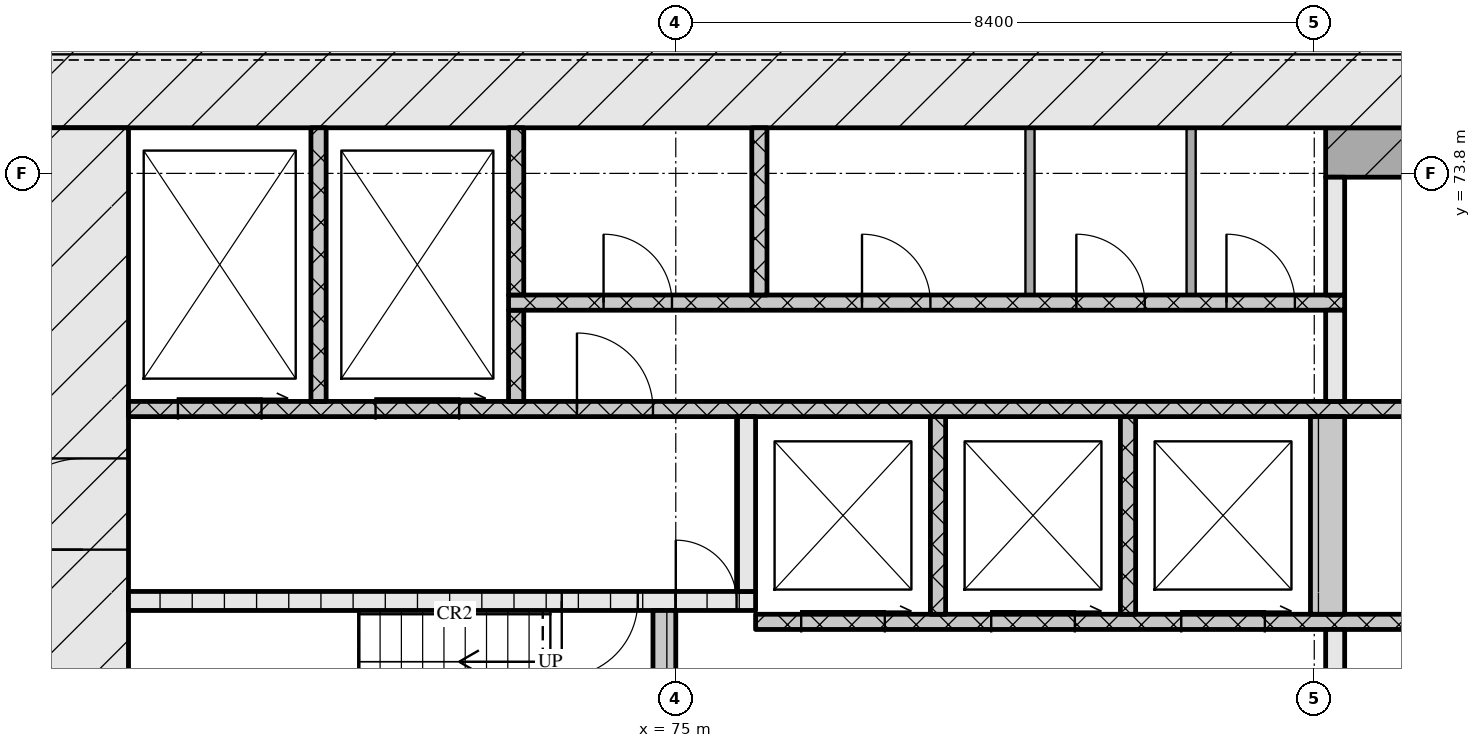
"""IFC4 building model, lengths in metres.
Left out: names, types, materials, properties, quantities, classifications, styles, units other than length and angle.
Written with IfcOpenShell. Run it as: python <this file> out.ifc"""

import sys

from ifc_helpers import new_model, si_unit, direction, frame, frame_2d, origin, place, context, subcontext, project, spatial, rectangle, extrude, element, fill, save


model = new_model("IFC4")
c1 = context("Model", 3, precision=1e-05, world=origin(), true_north=direction((0.0, 1.0)))
c2 = subcontext(c1, "Body", "Model", "MODEL_VIEW")
j1 = project(units=[si_unit("LENGTHUNIT", "METRE"), si_unit("PLANEANGLEUNIT", "RADIAN")], contexts=[c1])
p1 = place(None, origin())
s1 = spatial("IfcSite", under=j1, at=p1, CompositionType="ELEMENT")
p2 = place(p1, origin())
s2 = spatial("IfcBuilding", under=s1, at=p2, CompositionType="ELEMENT")
p3 = place(p2, frame((0.0, 0.0, 48.0)))
s3 = spatial("IfcBuildingStorey", under=s2, at=p3, CompositionType="ELEMENT", Elevation=48.0)
p4 = place(p3, frame((66.6, 75.0, 0.0), z_axis=(0.0, 0.0, 1.0), x_axis=(1.0, 0.0, 0.0)))
e1 = element("IfcWall", 1, at=p4, inside=s3, PredefinedType="SOLIDWALL", context=c2, shape_type="SweptSolid", body=[
    extrude(rectangle(XDim=42.0, YDim=1.2, at=frame_2d((21.0, 0.0))), origin(), (0.0, 0.0, 1.0), 3.32),
])
p5 = place(p3, frame((67.2, 62.4, 0.0), z_axis=(0.0, 0.0, 1.0), x_axis=(0.0, 1.0, 0.0)))
e2 = element("IfcWall", 2, at=p5, inside=s3, PredefinedType="SOLIDWALL", context=c2, shape_type="SweptSolid", body=[
    extrude(rectangle(XDim=12.0, YDim=1.2, at=frame_2d((6.0, 0.0))), origin(), (0.0, 0.0, 1.0), 3.32),
])
p6 = place(p5, frame((6.45, 0.0, 0.0)))
e3 = element("IfcOpeningElement", 3, at=p6, cuts=e2, PredefinedType="OPENING", context=c2, shape_type="SweptSolid", body=[
    extrude(rectangle(XDim=1.2, YDim=2.1, at=frame_2d((0.6, 1.05))), frame((0.0, 0.61, 0.0), z_axis=(0.0, -1.0, 0.0), x_axis=(1.0, 0.0, 0.0)), (0.0, 0.0, 1.0), 1.22),
])
p7 = place(p3, frame((74.85, 65.2, 0.0), z_axis=(0.0, 0.0, 1.0), x_axis=(0.0, 1.0, 0.0)))
e4 = element("IfcWall", 4, at=p7, inside=s3, PredefinedType="SOLIDWALL", context=c2, shape_type="SweptSolid", body=[
    extrude(rectangle(XDim=2.85, YDim=0.3, at=frame_2d((1.425, 0.0))), origin(), (0.0, 0.0, 1.0), 3.32),
])
p8 = place(p3, frame((83.675, 65.2, 0.0), z_axis=(0.0, 0.0, 1.0), x_axis=(0.0, 1.0, 0.0)))
e5 = element("IfcWall", 5, at=p8, inside=s3, PredefinedType="SOLIDWALL", context=c2, shape_type="SweptSolid", body=[
    extrude(rectangle(XDim=2.6, YDim=0.25, at=frame_2d((1.3, 0.0))), origin(), (0.0, 0.0, 1.0), 3.32),
])
p9 = place(p8, frame((0.7, 0.0, 0.0)))
e6 = element("IfcOpeningElement", 6, at=p9, cuts=e5, PredefinedType="OPENING", context=c2, shape_type="SweptSolid", body=[
    extrude(rectangle(XDim=1.2, YDim=2.1, at=frame_2d((0.6, 1.05))), frame((0.0, 0.135, 0.0), z_axis=(0.0, -1.0, 0.0), x_axis=(1.0, 0.0, 0.0)), (0.0, 0.0, 1.0), 0.27),
])
p10 = place(p3, frame((76.05, 67.9, 0.0), z_axis=(0.0, 0.0, 1.0), x_axis=(1.0, 0.0, 0.0)))
e7 = element("IfcWall", 7, at=p10, inside=s3, PredefinedType="SOLIDWALL", context=c2, shape_type="SweptSolid", body=[
    extrude(rectangle(XDim=23.1, YDim=0.2, at=frame_2d((11.55, 0.0))), origin(), (0.0, 0.0, 1.0), 3.32),
])
p11 = place(p10, frame((0.6, 0.0, 0.0)))
e8 = element("IfcOpeningElement", 8, at=p11, cuts=e7, PredefinedType="OPENING", context=c2, shape_type="SweptSolid", body=[
    extrude(rectangle(XDim=1.1, YDim=2.1, at=frame_2d((0.55, 1.05))), frame((0.0, 0.11, 0.0), z_axis=(0.0, -1.0, 0.0), x_axis=(1.0, 0.0, 0.0)), (0.0, 0.0, 1.0), 0.22),
])
p12 = place(p10, frame((3.1, 0.0, 0.0)))
e9 = element("IfcOpeningElement", 9, at=p12, cuts=e7, PredefinedType="OPENING", context=c2, shape_type="SweptSolid", body=[
    extrude(rectangle(XDim=1.1, YDim=2.1, at=frame_2d((0.55, 1.05))), frame((0.0, 0.11, 0.0), z_axis=(0.0, -1.0, 0.0), x_axis=(1.0, 0.0, 0.0)), (0.0, 0.0, 1.0), 0.22),
])
p13 = place(p10, frame((5.6, 0.0, 0.0)))
e10 = element("IfcOpeningElement", 10, at=p13, cuts=e7, PredefinedType="OPENING", context=c2, shape_type="SweptSolid", body=[
    extrude(rectangle(XDim=1.1, YDim=2.1, at=frame_2d((0.55, 1.05))), frame((0.0, 0.11, 0.0), z_axis=(0.0, -1.0, 0.0), x_axis=(1.0, 0.0, 0.0)), (0.0, 0.0, 1.0), 0.22),
])
p14 = place(p10, frame((9.7, 0.0, 0.0)))
e11 = element("IfcOpeningElement", 11, at=p14, cuts=e7, PredefinedType="OPENING", context=c2, shape_type="SweptSolid", body=[
    extrude(rectangle(XDim=0.9, YDim=2.1, at=frame_2d((0.45, 1.05))), frame((0.0, 0.11, 0.0), z_axis=(0.0, -1.0, 0.0), x_axis=(1.0, 0.0, 0.0)), (0.0, 0.0, 1.0), 0.22),
])
p15 = place(p10, frame((13.55, 0.0, 0.0)))
e12 = element("IfcOpeningElement", 12, at=p15, cuts=e7, PredefinedType="OPENING", context=c2, shape_type="SweptSolid", body=[
    extrude(rectangle(XDim=1.0, YDim=2.1, at=frame_2d((0.5, 1.05))), frame((0.0, 0.11, 0.0), z_axis=(0.0, -1.0, 0.0), x_axis=(1.0, 0.0, 0.0)), (0.0, 0.0, 1.0), 0.22),
])
for number, where, z_axis, x_axis in (
    (13, (78.45, 68.0, 0.0), (0.0, 0.0, 1.0), (0.0, 1.0, 0.0)),
    (14, (80.95, 68.0, 0.0), (0.0, 0.0, 1.0), (0.0, 1.0, 0.0)),
):
    element("IfcWall", number, at=place(p3, frame(where, z_axis=z_axis, x_axis=x_axis)), inside=s3, PredefinedType="SOLIDWALL", context=c2, shape_type="SweptSolid", body=[
        extrude(rectangle(XDim=2.6, YDim=0.2, at=frame_2d((1.3, 0.0))), origin(), (0.0, 0.0, 1.0), 3.32),
    ])
p16 = place(p3, frame((83.575, 68.0, 0.0), z_axis=(0.0, 0.0, 1.0), x_axis=(0.0, 1.0, 0.0)))
e15 = element("IfcWall", 15, at=p16, inside=s3, PredefinedType="SOLIDWALL", context=c2, shape_type="SweptSolid", body=[
    extrude(rectangle(XDim=2.6, YDim=0.45, at=frame_2d((1.3, 0.0))), origin(), (0.0, 0.0, 1.0), 3.32),
])
p17 = place(p3, frame((67.8, 68.175, 0.0), z_axis=(0.0, 0.0, 1.0), x_axis=(1.0, 0.0, 0.0)))
e16 = element("IfcWall", 16, at=p17, inside=s3, PredefinedType="SOLIDWALL", context=c2, shape_type="SweptSolid", body=[
    extrude(rectangle(XDim=8.25, YDim=0.25, at=frame_2d((4.125, 0.0))), origin(), (0.0, 0.0, 1.0), 3.32),
])
p18 = place(p17, frame((5.7, 0.0, 0.0)))
e17 = element("IfcOpeningElement", 17, at=p18, cuts=e16, PredefinedType="OPENING", context=c2, shape_type="SweptSolid", body=[
    extrude(rectangle(XDim=1.0, YDim=2.1, at=frame_2d((0.5, 1.05))), frame((0.0, 0.135, 0.0), z_axis=(0.0, -1.0, 0.0), x_axis=(1.0, 0.0, 0.0)), (0.0, 0.0, 1.0), 0.27),
])
p19 = place(p17, frame((7.2, 0.0, 0.0)))
e18 = element("IfcOpeningElement", 18, at=p19, cuts=e16, PredefinedType="OPENING", context=c2, shape_type="SweptSolid", body=[
    extrude(rectangle(XDim=0.8, YDim=2.1, at=frame_2d((0.4, 1.05))), frame((0.0, 0.135, 0.0), z_axis=(0.0, -1.0, 0.0), x_axis=(1.0, 0.0, 0.0)), (0.0, 0.0, 1.0), 0.27),
])
p20 = place(p3, frame((75.925, 68.3, 0.0), z_axis=(0.0, 0.0, 1.0), x_axis=(0.0, 1.0, 0.0)))
e19 = element("IfcWall", 19, at=p20, inside=s3, PredefinedType="SOLIDWALL", context=c2, shape_type="SweptSolid", body=[
    extrude(rectangle(XDim=2.3, YDim=0.25, at=frame_2d((1.15, 0.0))), origin(), (0.0, 0.0, 1.0), 3.32),
])
p21 = place(p3, frame((67.8, 70.7, 0.0), z_axis=(0.0, 0.0, 1.0), x_axis=(1.0, 0.0, 0.0)))
e20 = element("IfcWall", 20, at=p21, inside=s3, PredefinedType="SOLIDWALL", context=c2, shape_type="SweptSolid", body=[
    extrude(rectangle(XDim=39.6, YDim=0.2, at=frame_2d((19.8, 0.0))), origin(), (0.0, 0.0, 1.0), 3.32),
])
p22 = place(p21, frame((0.65, 0.0, 0.0)))
e21 = element("IfcOpeningElement", 21, at=p22, cuts=e20, PredefinedType="OPENING", context=c2, shape_type="SweptSolid", body=[
    extrude(rectangle(XDim=1.1, YDim=2.1, at=frame_2d((0.55, 1.05))), frame((0.0, 0.11, 0.0), z_axis=(0.0, -1.0, 0.0), x_axis=(1.0, 0.0, 0.0)), (0.0, 0.0, 1.0), 0.22),
])
p23 = place(p21, frame((3.25, 0.0, 0.0)))
e22 = element("IfcOpeningElement", 22, at=p23, cuts=e20, PredefinedType="OPENING", context=c2, shape_type="SweptSolid", body=[
    extrude(rectangle(XDim=1.1, YDim=2.1, at=frame_2d((0.55, 1.05))), frame((0.0, 0.11, 0.0), z_axis=(0.0, -1.0, 0.0), x_axis=(1.0, 0.0, 0.0)), (0.0, 0.0, 1.0), 0.22),
])
p24 = place(p21, frame((5.9, 0.0, 0.0)))
e23 = element("IfcOpeningElement", 23, at=p24, cuts=e20, PredefinedType="OPENING", context=c2, shape_type="SweptSolid", body=[
    extrude(rectangle(XDim=1.0, YDim=2.1, at=frame_2d((0.5, 1.05))), frame((0.0, 0.11, 0.0), z_axis=(0.0, -1.0, 0.0), x_axis=(1.0, 0.0, 0.0)), (0.0, 0.0, 1.0), 0.22),
])
p25 = place(p21, frame((21.7, 0.0, 0.0)))
e24 = element("IfcOpeningElement", 24, at=p25, cuts=e20, PredefinedType="OPENING", context=c2, shape_type="SweptSolid", body=[
    extrude(rectangle(XDim=1.0, YDim=2.1, at=frame_2d((0.5, 1.05))), frame((0.0, 0.11, 0.0), z_axis=(0.0, -1.0, 0.0), x_axis=(1.0, 0.0, 0.0)), (0.0, 0.0, 1.0), 0.22),
])
p26 = place(p21, frame((32.7, 0.0, 0.0)))
e25 = element("IfcOpeningElement", 25, at=p26, cuts=e20, PredefinedType="OPENING", context=c2, shape_type="SweptSolid", body=[
    extrude(rectangle(XDim=1.0, YDim=2.1, at=frame_2d((0.5, 1.05))), frame((0.0, 0.11, 0.0), z_axis=(0.0, -1.0, 0.0), x_axis=(1.0, 0.0, 0.0)), (0.0, 0.0, 1.0), 0.22),
])
p27 = place(p21, frame((35.25, 0.0, 0.0)))
e26 = element("IfcOpeningElement", 26, at=p27, cuts=e20, PredefinedType="OPENING", context=c2, shape_type="SweptSolid", body=[
    extrude(rectangle(XDim=1.1, YDim=2.1, at=frame_2d((0.55, 1.05))), frame((0.0, 0.11, 0.0), z_axis=(0.0, -1.0, 0.0), x_axis=(1.0, 0.0, 0.0)), (0.0, 0.0, 1.0), 0.22),
])
p28 = place(p21, frame((37.85, 0.0, 0.0)))
e27 = element("IfcOpeningElement", 27, at=p28, cuts=e20, PredefinedType="OPENING", context=c2, shape_type="SweptSolid", body=[
    extrude(rectangle(XDim=1.1, YDim=2.1, at=frame_2d((0.55, 1.05))), frame((0.0, 0.11, 0.0), z_axis=(0.0, -1.0, 0.0), x_axis=(1.0, 0.0, 0.0)), (0.0, 0.0, 1.0), 0.22),
])
p29 = place(p3, frame((70.3, 70.8, 0.0), z_axis=(0.0, 0.0, 1.0), x_axis=(0.0, 1.0, 0.0)))
e28 = element("IfcWall", 28, at=p29, inside=s3, PredefinedType="SOLIDWALL", context=c2, shape_type="SweptSolid", body=[
    extrude(rectangle(XDim=3.6, YDim=0.2, at=frame_2d((1.8, 0.0))), origin(), (0.0, 0.0, 1.0), 3.32),
])
p30 = place(p3, frame((72.9, 70.8, 0.0), z_axis=(0.0, 0.0, 1.0), x_axis=(0.0, 1.0, 0.0)))
e29 = element("IfcWall", 29, at=p30, inside=s3, PredefinedType="SOLIDWALL", context=c2, shape_type="SweptSolid", body=[
    extrude(rectangle(XDim=1.2, YDim=0.2, at=frame_2d((0.6, 0.0))), origin(), (0.0, 0.0, 1.0), 3.32),
])
p31 = place(p3, frame((83.675, 70.8, 0.0), z_axis=(0.0, 0.0, 1.0), x_axis=(0.0, 1.0, 0.0)))
e30 = element("IfcWall", 30, at=p31, inside=s3, PredefinedType="SOLIDWALL", context=c2, shape_type="SweptSolid", body=[
    extrude(rectangle(XDim=1.2, YDim=0.25, at=frame_2d((0.6, 0.0))), origin(), (0.0, 0.0, 1.0), 3.32),
])
p32 = place(p3, frame((72.8, 72.1, 0.0), z_axis=(0.0, 0.0, 1.0), x_axis=(1.0, 0.0, 0.0)))
e31 = element("IfcWall", 31, at=p32, inside=s3, PredefinedType="SOLIDWALL", context=c2, shape_type="SweptSolid", body=[
    extrude(rectangle(XDim=11.0, YDim=0.2, at=frame_2d((5.5, 0.0))), origin(), (0.0, 0.0, 1.0), 3.32),
])
p33 = place(p32, frame((1.25, 0.0, 0.0)))
e32 = element("IfcOpeningElement", 32, at=p33, cuts=e31, PredefinedType="OPENING", context=c2, shape_type="SweptSolid", body=[
    extrude(rectangle(XDim=0.9, YDim=2.1, at=frame_2d((0.45, 1.05))), frame((0.0, 0.11, 0.0), z_axis=(0.0, -1.0, 0.0), x_axis=(1.0, 0.0, 0.0)), (0.0, 0.0, 1.0), 0.22),
])
p34 = place(p32, frame((4.65, 0.0, 0.0)))
e33 = element("IfcOpeningElement", 33, at=p34, cuts=e31, PredefinedType="OPENING", context=c2, shape_type="SweptSolid", body=[
    extrude(rectangle(XDim=0.9, YDim=2.1, at=frame_2d((0.45, 1.05))), frame((0.0, 0.11, 0.0), z_axis=(0.0, -1.0, 0.0), x_axis=(1.0, 0.0, 0.0)), (0.0, 0.0, 1.0), 0.22),
])
p35 = place(p32, frame((7.47, 0.0, 0.0)))
e34 = element("IfcOpeningElement", 34, at=p35, cuts=e31, PredefinedType="OPENING", context=c2, shape_type="SweptSolid", body=[
    extrude(rectangle(XDim=0.9, YDim=2.1, at=frame_2d((0.45, 1.05))), frame((0.0, 0.11, 0.0), z_axis=(0.0, -1.0, 0.0), x_axis=(1.0, 0.0, 0.0)), (0.0, 0.0, 1.0), 0.22),
])
p36 = place(p32, frame((9.445, 0.0, 0.0)))
e35 = element("IfcOpeningElement", 35, at=p36, cuts=e31, PredefinedType="OPENING", context=c2, shape_type="SweptSolid", body=[
    extrude(rectangle(XDim=0.9, YDim=2.1, at=frame_2d((0.45, 1.05))), frame((0.0, 0.11, 0.0), z_axis=(0.0, -1.0, 0.0), x_axis=(1.0, 0.0, 0.0)), (0.0, 0.0, 1.0), 0.22),
])
for number, where, z_axis, x_axis in (
    (36, (72.9, 72.2, 0.0), (0.0, 0.0, 1.0), (0.0, 1.0, 0.0)),
    (37, (76.1, 72.2, 0.0), (0.0, 0.0, 1.0), (0.0, 1.0, 0.0)),
):
    element("IfcWall", number, at=place(p3, frame(where, z_axis=z_axis, x_axis=x_axis)), inside=s3, PredefinedType="SOLIDWALL", context=c2, shape_type="SweptSolid", body=[
        extrude(rectangle(XDim=2.2, YDim=0.2, at=frame_2d((1.1, 0.0))), origin(), (0.0, 0.0, 1.0), 3.32),
    ])
for number, where, z_axis, x_axis in (
    (38, (79.66, 72.2, 0.0), (0.0, 0.0, 1.0), (0.0, 1.0, 0.0)),
    (39, (81.78, 72.2, 0.0), (0.0, 0.0, 1.0), (0.0, 1.0, 0.0)),
):
    element("IfcWall", number, at=place(p3, frame(where, z_axis=z_axis, x_axis=x_axis)), inside=s3, PredefinedType="PARTITIONING", context=c2, shape_type="SweptSolid", body=[
        extrude(rectangle(XDim=2.2, YDim=0.12, at=frame_2d((1.1, 0.0))), origin(), (0.0, 0.0, 1.0), 3.32),
    ])
p37 = place(p3, frame((83.675, 72.2, 0.0), z_axis=(0.0, 0.0, 1.0), x_axis=(0.0, 1.0, 0.0)))
e40 = element("IfcWall", 40, at=p37, inside=s3, PredefinedType="SOLIDWALL", context=c2, shape_type="SweptSolid", body=[
    extrude(rectangle(XDim=1.55, YDim=0.25, at=frame_2d((0.775, 0.0))), origin(), (0.0, 0.0, 1.0), 3.32),
])
p38 = place(p3, frame((83.55, 74.075, 0.0), z_axis=(0.0, 0.0, 1.0), x_axis=(1.0, 0.0, 0.0)))
e41 = element("IfcWall", 41, at=p38, inside=s3, PredefinedType="SOLIDWALL", context=c2, shape_type="SweptSolid", body=[
    extrude(rectangle(XDim=8.1, YDim=0.65, at=frame_2d((4.05, 0.0))), origin(), (0.0, 0.0, 1.0), 3.32),
])
p39 = place(p11, origin())
e42 = element("IfcDoor", 42, at=p39, inside=s3, OperationType="SLIDING_TO_RIGHT", PredefinedType="DOOR", context=c2, shape_type="SweptSolid", body=[
    extrude(rectangle(XDim=1.1, YDim=2.1, at=frame_2d((0.55, 1.05))), frame((0.0, 0.025, 0.0), z_axis=(0.0, -1.0, 0.0), x_axis=(1.0, 0.0, 0.0)), (0.0, 0.0, 1.0), 0.05),
])
fill(e8, e42)
p40 = place(p12, origin())
e43 = element("IfcDoor", 43, at=p40, inside=s3, OperationType="SLIDING_TO_RIGHT", PredefinedType="DOOR", context=c2, shape_type="SweptSolid", body=[
    extrude(rectangle(XDim=1.1, YDim=2.1, at=frame_2d((0.55, 1.05))), frame((0.0, 0.025, 0.0), z_axis=(0.0, -1.0, 0.0), x_axis=(1.0, 0.0, 0.0)), (0.0, 0.0, 1.0), 0.05),
])
fill(e9, e43)
p41 = place(p13, origin())
e44 = element("IfcDoor", 44, at=p41, inside=s3, OperationType="SLIDING_TO_RIGHT", PredefinedType="DOOR", context=c2, shape_type="SweptSolid", body=[
    extrude(rectangle(XDim=1.1, YDim=2.1, at=frame_2d((0.55, 1.05))), frame((0.0, 0.025, 0.0), z_axis=(0.0, -1.0, 0.0), x_axis=(1.0, 0.0, 0.0)), (0.0, 0.0, 1.0), 0.05),
])
fill(e10, e44)
p42 = place(p18, origin())
e45 = element("IfcDoor", 45, at=p42, inside=s3, OperationType="SINGLE_SWING_RIGHT", PredefinedType="DOOR", context=c2, shape_type="SweptSolid", body=[
    extrude(rectangle(XDim=1.0, YDim=2.1, at=frame_2d((0.5, 1.05))), frame((0.0, 0.025, 0.0), z_axis=(0.0, -1.0, 0.0), x_axis=(1.0, 0.0, 0.0)), (0.0, 0.0, 1.0), 0.05),
])
fill(e17, e45)
p43 = place(p19, origin())
e46 = element("IfcDoor", 46, at=p43, inside=s3, OperationType="SINGLE_SWING_LEFT", PredefinedType="DOOR", context=c2, shape_type="SweptSolid", body=[
    extrude(rectangle(XDim=0.8, YDim=2.1, at=frame_2d((0.4, 1.05))), frame((0.0, 0.025, 0.0), z_axis=(0.0, -1.0, 0.0), x_axis=(1.0, 0.0, 0.0)), (0.0, 0.0, 1.0), 0.05),
])
fill(e18, e46)
p44 = place(p6, origin())
e47 = element("IfcDoor", 47, at=p44, inside=s3, OperationType="SINGLE_SWING_LEFT", PredefinedType="DOOR", context=c2, shape_type="SweptSolid", body=[
    extrude(rectangle(XDim=1.2, YDim=2.1, at=frame_2d((0.6, 1.05))), frame((0.0, 0.025, 0.0), z_axis=(0.0, -1.0, 0.0), x_axis=(1.0, 0.0, 0.0)), (0.0, 0.0, 1.0), 0.05),
])
fill(e3, e47)
p45 = place(p22, origin())
e48 = element("IfcDoor", 48, at=p45, inside=s3, OperationType="SLIDING_TO_RIGHT", PredefinedType="DOOR", context=c2, shape_type="SweptSolid", body=[
    extrude(rectangle(XDim=1.1, YDim=2.1, at=frame_2d((0.55, 1.05))), frame((0.0, 0.025, 0.0), z_axis=(0.0, -1.0, 0.0), x_axis=(1.0, 0.0, 0.0)), (0.0, 0.0, 1.0), 0.05),
])
fill(e21, e48)
p46 = place(p23, origin())
e49 = element("IfcDoor", 49, at=p46, inside=s3, OperationType="SLIDING_TO_RIGHT", PredefinedType="DOOR", context=c2, shape_type="SweptSolid", body=[
    extrude(rectangle(XDim=1.1, YDim=2.1, at=frame_2d((0.55, 1.05))), frame((0.0, 0.025, 0.0), z_axis=(0.0, -1.0, 0.0), x_axis=(1.0, 0.0, 0.0)), (0.0, 0.0, 1.0), 0.05),
])
fill(e22, e49)
p47 = place(p24, origin())
e50 = element("IfcDoor", 50, at=p47, inside=s3, OperationType="SINGLE_SWING_LEFT", PredefinedType="DOOR", context=c2, shape_type="SweptSolid", body=[
    extrude(rectangle(XDim=1.0, YDim=2.1, at=frame_2d((0.5, 1.05))), frame((0.0, 0.025, 0.0), z_axis=(0.0, -1.0, 0.0), x_axis=(1.0, 0.0, 0.0)), (0.0, 0.0, 1.0), 0.05),
])
fill(e23, e50)
p48 = place(p33, origin())
e51 = element("IfcDoor", 51, at=p48, inside=s3, OperationType="SINGLE_SWING_LEFT", PredefinedType="DOOR", context=c2, shape_type="SweptSolid", body=[
    extrude(rectangle(XDim=0.9, YDim=2.1, at=frame_2d((0.45, 1.05))), frame((0.0, 0.025, 0.0), z_axis=(0.0, -1.0, 0.0), x_axis=(1.0, 0.0, 0.0)), (0.0, 0.0, 1.0), 0.05),
])
fill(e32, e51)
p49 = place(p34, origin())
e52 = element("IfcDoor", 52, at=p49, inside=s3, OperationType="SINGLE_SWING_LEFT", PredefinedType="DOOR", context=c2, shape_type="SweptSolid", body=[
    extrude(rectangle(XDim=0.9, YDim=2.1, at=frame_2d((0.45, 1.05))), frame((0.0, 0.025, 0.0), z_axis=(0.0, -1.0, 0.0), x_axis=(1.0, 0.0, 0.0)), (0.0, 0.0, 1.0), 0.05),
])
fill(e33, e52)
p50 = place(p35, origin())
e53 = element("IfcDoor", 53, at=p50, inside=s3, OperationType="SINGLE_SWING_LEFT", PredefinedType="DOOR", context=c2, shape_type="SweptSolid", body=[
    extrude(rectangle(XDim=0.9, YDim=2.1, at=frame_2d((0.45, 1.05))), frame((0.0, 0.025, 0.0), z_axis=(0.0, -1.0, 0.0), x_axis=(1.0, 0.0, 0.0)), (0.0, 0.0, 1.0), 0.05),
])
fill(e34, e53)
p51 = place(p36, origin())
e54 = element("IfcDoor", 54, at=p51, inside=s3, OperationType="SINGLE_SWING_LEFT", PredefinedType="DOOR", context=c2, shape_type="SweptSolid", body=[
    extrude(rectangle(XDim=0.9, YDim=2.1, at=frame_2d((0.45, 1.05))), frame((0.0, 0.025, 0.0), z_axis=(0.0, -1.0, 0.0), x_axis=(1.0, 0.0, 0.0)), (0.0, 0.0, 1.0), 0.05),
])
fill(e35, e54)
save(model, sys.argv[1])
